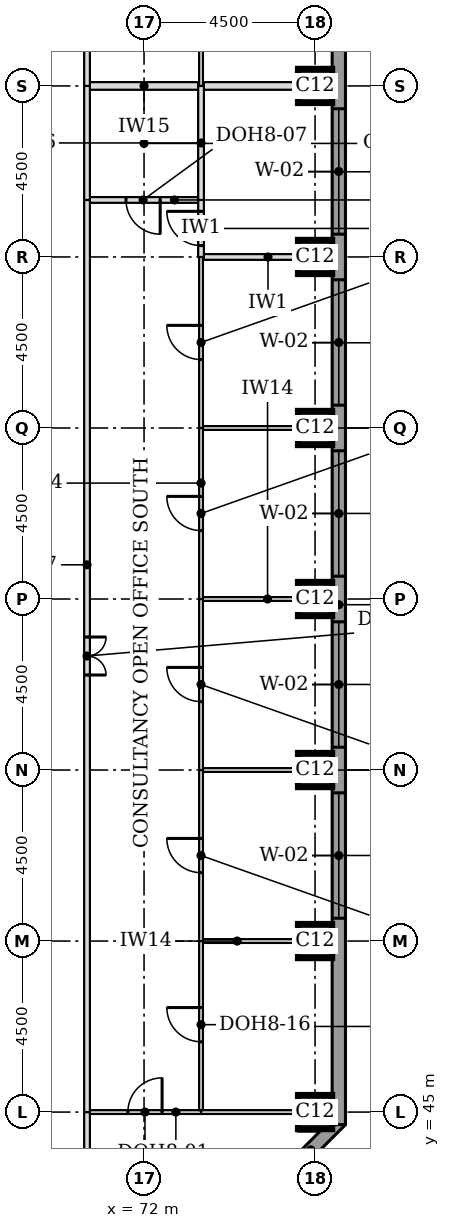
"""IFC4 building model, lengths in metres.
Left out: names, types, materials, properties, quantities, classifications, styles, units other than length and angle.
Written with IfcOpenShell. Run it as: python <this file> out.ifc"""

import sys

from ifc_helpers import new_model, si_unit, direction, frame, frame_2d, origin, origin_2d, place, context, subcontext, project, spatial, rectangle, extrude, element, fill, save


model = new_model("IFC4")
c1 = context("Model", 3, precision=1e-05, world=origin(), true_north=direction((0.0, 1.0)))
c2 = subcontext(c1, "Body", "Model", "MODEL_VIEW")
j1 = project(units=[si_unit("LENGTHUNIT", "METRE"), si_unit("PLANEANGLEUNIT", "RADIAN")], contexts=[c1])
p1 = place(None, origin())
s1 = spatial("IfcSite", under=j1, at=p1, CompositionType="ELEMENT")
p2 = place(p1, origin())
s2 = spatial("IfcBuilding", under=s1, at=p2, CompositionType="ELEMENT")
p3 = place(p2, frame((0.0, 0.0, 203.2)))
s3 = spatial("IfcBuildingStorey", under=s2, at=p3, CompositionType="ELEMENT", Elevation=203.2)
for number, where, z_axis, x_axis in (
    (1, (76.5, 45.0, 0.0), (0.0, 0.0, 1.0), (1.0, 0.0, 0.0)),
    (2, (76.5, 49.5, 0.0), (0.0, 0.0, 1.0), (1.0, 0.0, 0.0)),
    (3, (76.5, 54.0, 0.0), (0.0, 0.0, 1.0), (1.0, 0.0, 0.0)),
    (4, (76.5, 58.5, 0.0), (0.0, 0.0, 1.0), (1.0, 0.0, 0.0)),
    (5, (76.5, 63.0, 0.0), (0.0, 0.0, 1.0), (1.0, 0.0, 0.0)),
    (6, (76.5, 67.5, 0.0), (0.0, 0.0, 1.0), (1.0, 0.0, 0.0)),
    (7, (76.5, 72.0, 0.0), (0.0, 0.0, 1.0), (1.0, 0.0, 0.0)),
):
    element("IfcColumn", number, at=place(p3, frame(where, z_axis=z_axis, x_axis=x_axis)), inside=s3, PredefinedType="COLUMN", context=c2, shape_type="SweptSolid", body=[
        extrude(rectangle(XDim=0.9, YDim=0.9, at=origin_2d()), origin(), (0.0, 0.0, 1.0), 3.7),
    ])
p4 = place(p3, frame((72.208, 39.824, 0.0), z_axis=(0.0, 0.0, 1.0), x_axis=(0.707106781187, 0.707106781187, 0.0)))
e8 = element("IfcWall", 8, at=p4, inside=s3, PredefinedType="STANDARD", context=c2, shape_type="SweptSolid", body=[
    extrude(rectangle(XDim=7.027, YDim=0.35, at=frame_2d((3.513, 0.0))), origin(), (0.0, 0.0, 1.0), 3.525),
])
p5 = place(p4, frame((1.863, 0.0, 0.9)))
e9 = element("IfcOpeningElement", 9, at=p5, cuts=e8, PredefinedType="OPENING", context=c2, shape_type="SweptSolid", body=[
    extrude(rectangle(XDim=3.3, YDim=1.9, at=frame_2d((1.65, 0.95))), frame((0.0, 0.185, 0.0), z_axis=(0.0, -1.0, 0.0), x_axis=(1.0, 0.0, 0.0)), (0.0, 0.0, 1.0), 0.37),
])
p6 = place(p3, frame((77.125, 44.669, 0.0), z_axis=(0.0, 0.0, 1.0), x_axis=(0.0, 1.0, 0.0)))
e10 = element("IfcWall", 10, at=p6, inside=s3, PredefinedType="STANDARD", context=c2, shape_type="SweptSolid", body=[
    extrude(rectangle(XDim=32.163, YDim=0.35, at=frame_2d((16.081, 0.0))), origin(), (0.0, 0.0, 1.0), 3.525),
])
p7 = place(p6, frame((5.431, 0.0, 0.9)))
e11 = element("IfcOpeningElement", 11, at=p7, cuts=e10, PredefinedType="OPENING", context=c2, shape_type="SweptSolid", body=[
    extrude(rectangle(XDim=3.3, YDim=1.9, at=frame_2d((1.65, 0.95))), frame((0.0, 0.185, 0.0), z_axis=(0.0, -1.0, 0.0), x_axis=(1.0, 0.0, 0.0)), (0.0, 0.0, 1.0), 0.37),
])
p8 = place(p6, frame((9.931, 0.0, 0.9)))
e12 = element("IfcOpeningElement", 12, at=p8, cuts=e10, PredefinedType="OPENING", context=c2, shape_type="SweptSolid", body=[
    extrude(rectangle(XDim=3.3, YDim=1.9, at=frame_2d((1.65, 0.95))), frame((0.0, 0.185, 0.0), z_axis=(0.0, -1.0, 0.0), x_axis=(1.0, 0.0, 0.0)), (0.0, 0.0, 1.0), 0.37),
])
p9 = place(p6, frame((14.431, 0.0, 0.9)))
e13 = element("IfcOpeningElement", 13, at=p9, cuts=e10, PredefinedType="OPENING", context=c2, shape_type="SweptSolid", body=[
    extrude(rectangle(XDim=3.3, YDim=1.9, at=frame_2d((1.65, 0.95))), frame((0.0, 0.185, 0.0), z_axis=(0.0, -1.0, 0.0), x_axis=(1.0, 0.0, 0.0)), (0.0, 0.0, 1.0), 0.37),
])
p10 = place(p6, frame((18.931, 0.0, 0.9)))
e14 = element("IfcOpeningElement", 14, at=p10, cuts=e10, PredefinedType="OPENING", context=c2, shape_type="SweptSolid", body=[
    extrude(rectangle(XDim=3.3, YDim=1.9, at=frame_2d((1.65, 0.95))), frame((0.0, 0.185, 0.0), z_axis=(0.0, -1.0, 0.0), x_axis=(1.0, 0.0, 0.0)), (0.0, 0.0, 1.0), 0.37),
])
p11 = place(p6, frame((23.431, 0.0, 0.9)))
e15 = element("IfcOpeningElement", 15, at=p11, cuts=e10, PredefinedType="OPENING", context=c2, shape_type="SweptSolid", body=[
    extrude(rectangle(XDim=3.3, YDim=1.9, at=frame_2d((1.65, 0.95))), frame((0.0, 0.185, 0.0), z_axis=(0.0, -1.0, 0.0), x_axis=(1.0, 0.0, 0.0)), (0.0, 0.0, 1.0), 0.37),
])
p12 = place(p3, frame((70.575, 45.0, 0.0), z_axis=(0.0, 0.0, 1.0), x_axis=(1.0, 0.0, 0.0)))
e16 = element("IfcWall", 16, at=p12, inside=s3, PredefinedType="PARTITIONING", context=c2, shape_type="SweptSolid", body=[
    extrude(rectangle(XDim=2.925, YDim=0.1, at=frame_2d((1.462, 0.0))), origin(), (0.0, 0.0, 1.0), 2.948),
])
p13 = place(p12, frame((1.0, 0.0, 0.0)))
e17 = element("IfcOpeningElement", 17, at=p13, cuts=e16, PredefinedType="OPENING", context=c2, shape_type="SweptSolid", body=[
    extrude(rectangle(XDim=0.9, YDim=2.1, at=frame_2d((0.45, 1.05))), frame((0.0, 0.06, 0.0), z_axis=(0.0, -1.0, 0.0), x_axis=(1.0, 0.0, 0.0)), (0.0, 0.0, 1.0), 0.12),
])
p14 = place(p3, frame((73.5, 45.0, 0.0), z_axis=(0.0, 0.0, 1.0), x_axis=(1.0, 0.0, 0.0)))
e18 = element("IfcWall", 18, at=p14, inside=s3, PredefinedType="PARTITIONING", context=c2, shape_type="SweptSolid", body=[
    extrude(rectangle(XDim=2.55, YDim=0.1, at=frame_2d((1.275, 0.0))), origin(), (0.0, 0.0, 1.0), 2.948),
])
for number, where, z_axis, x_axis in (
    (19, (73.55, 49.5, 0.0), (0.0, 0.0, 1.0), (1.0, 0.0, 0.0)),
    (20, (73.55, 54.0, 0.0), (0.0, 0.0, 1.0), (1.0, 0.0, 0.0)),
    (21, (73.55, 58.5, 0.0), (0.0, 0.0, 1.0), (1.0, 0.0, 0.0)),
    (22, (73.55, 63.0, 0.0), (0.0, 0.0, 1.0), (1.0, 0.0, 0.0)),
):
    element("IfcWall", number, at=place(p3, frame(where, z_axis=z_axis, x_axis=x_axis)), inside=s3, PredefinedType="PARTITIONING", context=c2, shape_type="SweptSolid", body=[
        extrude(rectangle(XDim=3.4, YDim=0.1, at=frame_2d((1.7, 0.0))), origin(), (0.0, 0.0, 1.0), 3.55),
    ])
p15 = place(p3, frame((73.575, 67.5, 0.0), z_axis=(0.0, 0.0, 1.0), x_axis=(1.0, 0.0, 0.0)))
e23 = element("IfcWall", 23, at=p15, inside=s3, PredefinedType="PARTITIONING", context=c2, shape_type="SweptSolid", body=[
    extrude(rectangle(XDim=3.375, YDim=0.15, at=frame_2d((1.688, 0.0))), origin(), (0.0, 0.0, 1.0), 3.55),
])
p16 = place(p3, frame((70.575, 69.0, 0.0), z_axis=(0.0, 0.0, 1.0), x_axis=(1.0, 0.0, 0.0)))
e24 = element("IfcWall", 24, at=p16, inside=s3, PredefinedType="PARTITIONING", context=c2, shape_type="SweptSolid", body=[
    extrude(rectangle(XDim=2.85, YDim=0.15, at=frame_2d((1.425, 0.0))), origin(), (0.0, 0.0, 1.0), 3.55),
])
p17 = place(p16, frame((0.95, 0.0, 0.0)))
e25 = element("IfcOpeningElement", 25, at=p17, cuts=e24, PredefinedType="OPENING", context=c2, shape_type="SweptSolid", body=[
    extrude(rectangle(XDim=0.9, YDim=2.1, at=frame_2d((0.45, 1.05))), frame((0.0, 0.085, 0.0), z_axis=(0.0, -1.0, 0.0), x_axis=(1.0, 0.0, 0.0)), (0.0, 0.0, 1.0), 0.17),
])
p18 = place(p3, frame((70.575, 72.0, 0.0), z_axis=(0.0, 0.0, 1.0), x_axis=(1.0, 0.0, 0.0)))
e26 = element("IfcWall", 26, at=p18, inside=s3, PredefinedType="PARTITIONING", context=c2, shape_type="SweptSolid", body=[
    extrude(rectangle(XDim=2.85, YDim=0.2, at=frame_2d((1.425, 0.0))), origin(), (0.0, 0.0, 1.0), 3.55),
])
p19 = place(p3, frame((73.575, 72.0, 0.0), z_axis=(0.0, 0.0, 1.0), x_axis=(1.0, 0.0, 0.0)))
e27 = element("IfcWall", 27, at=p19, inside=s3, PredefinedType="PARTITIONING", context=c2, shape_type="SweptSolid", body=[
    extrude(rectangle(XDim=3.375, YDim=0.2, at=frame_2d((1.688, 0.0))), origin(), (0.0, 0.0, 1.0), 3.55),
])
p20 = place(p3, frame((70.5, 40.05, 0.0), z_axis=(0.0, 0.0, 1.0), x_axis=(0.0, 1.0, 0.0)))
e28 = element("IfcWall", 28, at=p20, inside=s3, PredefinedType="PARTITIONING", context=c2, shape_type="SweptSolid", body=[
    extrude(rectangle(XDim=4.95, YDim=0.15, at=frame_2d((2.475, 0.0))), origin(), (0.0, 0.0, 1.0), 3.55),
])
p21 = place(p3, frame((70.5, 45.0, 0.0), z_axis=(0.0, 0.0, 1.0), x_axis=(0.0, 1.0, 0.0)))
e29 = element("IfcWall", 29, at=p21, inside=s3, PredefinedType="PARTITIONING", context=c2, shape_type="SweptSolid", body=[
    extrude(rectangle(XDim=24.0, YDim=0.15, at=frame_2d((12.0, 0.0))), origin(), (0.0, 0.0, 1.0), 3.55),
])
p22 = place(p21, frame((11.5, 0.0, 0.0)))
e30 = element("IfcOpeningElement", 30, at=p22, cuts=e29, PredefinedType="OPENING", context=c2, shape_type="SweptSolid", body=[
    extrude(rectangle(XDim=1.0, YDim=2.1, at=frame_2d((0.5, 1.05))), frame((0.0, 0.085, 0.0), z_axis=(0.0, -1.0, 0.0), x_axis=(1.0, 0.0, 0.0)), (0.0, 0.0, 1.0), 0.17),
])
p23 = place(p3, frame((73.5, 45.05, 0.0), z_axis=(0.0, 0.0, 1.0), x_axis=(0.0, 1.0, 0.0)))
e31 = element("IfcWall", 31, at=p23, inside=s3, PredefinedType="PARTITIONING", context=c2, shape_type="SweptSolid", body=[
    extrude(rectangle(XDim=4.45, YDim=0.1, at=frame_2d((2.225, 0.0))), origin(), (0.0, 0.0, 1.0), 3.55),
])
p24 = place(p23, frame((1.8, 0.0, 0.0)))
e32 = element("IfcOpeningElement", 32, at=p24, cuts=e31, PredefinedType="OPENING", context=c2, shape_type="SweptSolid", body=[
    extrude(rectangle(XDim=0.9, YDim=2.1, at=frame_2d((0.45, 1.05))), frame((0.0, 0.06, 0.0), z_axis=(0.0, -1.0, 0.0), x_axis=(1.0, 0.0, 0.0)), (0.0, 0.0, 1.0), 0.12),
])
p25 = place(p3, frame((73.5, 49.5, 0.0), z_axis=(0.0, 0.0, 1.0), x_axis=(0.0, 1.0, 0.0)))
e33 = element("IfcWall", 33, at=p25, inside=s3, PredefinedType="PARTITIONING", context=c2, shape_type="SweptSolid", body=[
    extrude(rectangle(XDim=4.5, YDim=0.1, at=frame_2d((2.25, 0.0))), origin(), (0.0, 0.0, 1.0), 3.55),
])
p26 = place(p25, frame((1.8, 0.0, 0.0)))
e34 = element("IfcOpeningElement", 34, at=p26, cuts=e33, PredefinedType="OPENING", context=c2, shape_type="SweptSolid", body=[
    extrude(rectangle(XDim=0.9, YDim=2.1, at=frame_2d((0.45, 1.05))), frame((0.0, 0.06, 0.0), z_axis=(0.0, -1.0, 0.0), x_axis=(1.0, 0.0, 0.0)), (0.0, 0.0, 1.0), 0.12),
])
p27 = place(p3, frame((73.5, 54.0, 0.0), z_axis=(0.0, 0.0, 1.0), x_axis=(0.0, 1.0, 0.0)))
e35 = element("IfcWall", 35, at=p27, inside=s3, PredefinedType="PARTITIONING", context=c2, shape_type="SweptSolid", body=[
    extrude(rectangle(XDim=4.5, YDim=0.1, at=frame_2d((2.25, 0.0))), origin(), (0.0, 0.0, 1.0), 3.55),
])
p28 = place(p27, frame((1.8, 0.0, 0.0)))
e36 = element("IfcOpeningElement", 36, at=p28, cuts=e35, PredefinedType="OPENING", context=c2, shape_type="SweptSolid", body=[
    extrude(rectangle(XDim=0.9, YDim=2.1, at=frame_2d((0.45, 1.05))), frame((0.0, 0.06, 0.0), z_axis=(0.0, -1.0, 0.0), x_axis=(1.0, 0.0, 0.0)), (0.0, 0.0, 1.0), 0.12),
])
p29 = place(p3, frame((73.5, 58.5, 0.0), z_axis=(0.0, 0.0, 1.0), x_axis=(0.0, 1.0, 0.0)))
e37 = element("IfcWall", 37, at=p29, inside=s3, PredefinedType="PARTITIONING", context=c2, shape_type="SweptSolid", body=[
    extrude(rectangle(XDim=4.5, YDim=0.1, at=frame_2d((2.25, 0.0))), origin(), (0.0, 0.0, 1.0), 3.55),
])
p30 = place(p29, frame((1.8, 0.0, 0.0)))
e38 = element("IfcOpeningElement", 38, at=p30, cuts=e37, PredefinedType="OPENING", context=c2, shape_type="SweptSolid", body=[
    extrude(rectangle(XDim=0.9, YDim=2.1, at=frame_2d((0.45, 1.05))), frame((0.0, 0.06, 0.0), z_axis=(0.0, -1.0, 0.0), x_axis=(1.0, 0.0, 0.0)), (0.0, 0.0, 1.0), 0.12),
])
p31 = place(p3, frame((73.5, 63.0, 0.0), z_axis=(0.0, 0.0, 1.0), x_axis=(0.0, 1.0, 0.0)))
e39 = element("IfcWall", 39, at=p31, inside=s3, PredefinedType="PARTITIONING", context=c2, shape_type="SweptSolid", body=[
    extrude(rectangle(XDim=4.5, YDim=0.1, at=frame_2d((2.25, 0.0))), origin(), (0.0, 0.0, 1.0), 3.55),
])
p32 = place(p31, frame((1.8, 0.0, 0.0)))
e40 = element("IfcOpeningElement", 40, at=p32, cuts=e39, PredefinedType="OPENING", context=c2, shape_type="SweptSolid", body=[
    extrude(rectangle(XDim=0.9, YDim=2.1, at=frame_2d((0.45, 1.05))), frame((0.0, 0.06, 0.0), z_axis=(0.0, -1.0, 0.0), x_axis=(1.0, 0.0, 0.0)), (0.0, 0.0, 1.0), 0.12),
])
p33 = place(p3, frame((73.5, 67.5, 0.0), z_axis=(0.0, 0.0, 1.0), x_axis=(0.0, 1.0, 0.0)))
e41 = element("IfcWall", 41, at=p33, inside=s3, PredefinedType="PARTITIONING", context=c2, shape_type="SweptSolid", body=[
    extrude(rectangle(XDim=1.5, YDim=0.15, at=frame_2d((0.75, 0.0))), origin(), (0.0, 0.0, 1.0), 3.55),
])
p34 = place(p33, frame((0.3, 0.0, 0.0)))
e42 = element("IfcOpeningElement", 42, at=p34, cuts=e41, PredefinedType="OPENING", context=c2, shape_type="SweptSolid", body=[
    extrude(rectangle(XDim=0.9, YDim=2.1, at=frame_2d((0.45, 1.05))), frame((0.0, 0.085, 0.0), z_axis=(0.0, -1.0, 0.0), x_axis=(1.0, 0.0, 0.0)), (0.0, 0.0, 1.0), 0.17),
])
for number, where, z_axis, x_axis in (
    (43, (70.5, 69.0, 0.0), (0.0, 0.0, 1.0), (0.0, 1.0, 0.0)),
    (44, (73.5, 69.0, 0.0), (0.0, 0.0, 1.0), (0.0, 1.0, 0.0)),
):
    element("IfcWall", number, at=place(p3, frame(where, z_axis=z_axis, x_axis=x_axis)), inside=s3, PredefinedType="PARTITIONING", context=c2, shape_type="SweptSolid", body=[
        extrude(rectangle(XDim=3.0, YDim=0.15, at=frame_2d((1.5, 0.0))), origin(), (0.0, 0.0, 1.0), 3.55),
    ])
p35 = place(p3, frame((70.5, 72.0, 0.0), z_axis=(0.0, 0.0, 1.0), x_axis=(0.0, 1.0, 0.0)))
e45 = element("IfcWall", 45, at=p35, inside=s3, PredefinedType="PARTITIONING", context=c2, shape_type="SweptSolid", body=[
    extrude(rectangle(XDim=4.5, YDim=0.15, at=frame_2d((2.25, 0.0))), origin(), (0.0, 0.0, 1.0), 3.55),
])
p36 = place(p35, frame((1.75, 0.0, 0.0)))
e46 = element("IfcOpeningElement", 46, at=p36, cuts=e45, PredefinedType="OPENING", context=c2, shape_type="SweptSolid", body=[
    extrude(rectangle(XDim=1.0, YDim=2.1, at=frame_2d((0.5, 1.05))), frame((0.0, 0.085, 0.0), z_axis=(0.0, -1.0, 0.0), x_axis=(1.0, 0.0, 0.0)), (0.0, 0.0, 1.0), 0.17),
])
p37 = place(p3, frame((73.5, 72.0, 0.0), z_axis=(0.0, 0.0, 1.0), x_axis=(0.0, 1.0, 0.0)))
e47 = element("IfcWall", 47, at=p37, inside=s3, PredefinedType="PARTITIONING", context=c2, shape_type="SweptSolid", body=[
    extrude(rectangle(XDim=4.425, YDim=0.1, at=frame_2d((2.212, 0.0))), origin(), (0.0, 0.0, 1.0), 3.55),
])
p38 = place(p37, frame((1.75, 0.0, 0.0)))
e48 = element("IfcOpeningElement", 48, at=p38, cuts=e47, PredefinedType="OPENING", context=c2, shape_type="SweptSolid", body=[
    extrude(rectangle(XDim=0.9, YDim=2.1, at=frame_2d((0.45, 1.05))), frame((0.0, 0.06, 0.0), z_axis=(0.0, -1.0, 0.0), x_axis=(1.0, 0.0, 0.0)), (0.0, 0.0, 1.0), 0.12),
])
p39 = place(p7, origin())
e49 = element("IfcWindow", 49, at=p39, inside=s3, PartitioningType="SINGLE_PANEL", PredefinedType="WINDOW", context=c2, shape_type="SweptSolid", body=[
    extrude(rectangle(XDim=3.3, YDim=1.9, at=frame_2d((1.65, 0.95))), frame((0.0, 0.085, 0.0), z_axis=(0.0, -1.0, 0.0), x_axis=(1.0, 0.0, 0.0)), (0.0, 0.0, 1.0), 0.06),
])
fill(e11, e49)
p40 = place(p8, origin())
e50 = element("IfcWindow", 50, at=p40, inside=s3, PartitioningType="SINGLE_PANEL", PredefinedType="WINDOW", context=c2, shape_type="SweptSolid", body=[
    extrude(rectangle(XDim=3.3, YDim=1.9, at=frame_2d((1.65, 0.95))), frame((0.0, 0.085, 0.0), z_axis=(0.0, -1.0, 0.0), x_axis=(1.0, 0.0, 0.0)), (0.0, 0.0, 1.0), 0.06),
])
fill(e12, e50)
p41 = place(p9, origin())
e51 = element("IfcWindow", 51, at=p41, inside=s3, PartitioningType="SINGLE_PANEL", PredefinedType="WINDOW", context=c2, shape_type="SweptSolid", body=[
    extrude(rectangle(XDim=3.3, YDim=1.9, at=frame_2d((1.65, 0.95))), frame((0.0, 0.085, 0.0), z_axis=(0.0, -1.0, 0.0), x_axis=(1.0, 0.0, 0.0)), (0.0, 0.0, 1.0), 0.06),
])
fill(e13, e51)
p42 = place(p10, origin())
e52 = element("IfcWindow", 52, at=p42, inside=s3, PartitioningType="SINGLE_PANEL", PredefinedType="WINDOW", context=c2, shape_type="SweptSolid", body=[
    extrude(rectangle(XDim=3.3, YDim=1.9, at=frame_2d((1.65, 0.95))), frame((0.0, 0.085, 0.0), z_axis=(0.0, -1.0, 0.0), x_axis=(1.0, 0.0, 0.0)), (0.0, 0.0, 1.0), 0.06),
])
fill(e14, e52)
p43 = place(p11, origin())
e53 = element("IfcWindow", 53, at=p43, inside=s3, PartitioningType="SINGLE_PANEL", PredefinedType="WINDOW", context=c2, shape_type="SweptSolid", body=[
    extrude(rectangle(XDim=3.3, YDim=1.9, at=frame_2d((1.65, 0.95))), frame((0.0, 0.085, 0.0), z_axis=(0.0, -1.0, 0.0), x_axis=(1.0, 0.0, 0.0)), (0.0, 0.0, 1.0), 0.06),
])
fill(e15, e53)
p44 = place(p22, frame((1.0, 0.0, 0.0), z_axis=(0.0, 0.0, 1.0), x_axis=(-1.0, 0.0, 0.0)))
e54 = element("IfcDoor", 54, at=p44, inside=s3, OperationType="DOUBLE_DOOR_SINGLE_SWING", PredefinedType="DOOR", context=c2, shape_type="SweptSolid", body=[
    extrude(rectangle(XDim=1.0, YDim=2.1, at=frame_2d((0.5, 1.05))), frame((0.0, 0.025, 0.0), z_axis=(0.0, -1.0, 0.0), x_axis=(1.0, 0.0, 0.0)), (0.0, 0.0, 1.0), 0.05),
])
fill(e30, e54)
p45 = place(p13, origin())
e55 = element("IfcDoor", 55, at=p45, inside=s3, OperationType="SINGLE_SWING_RIGHT", PredefinedType="DOOR", context=c2, shape_type="SweptSolid", body=[
    extrude(rectangle(XDim=0.9, YDim=2.1, at=frame_2d((0.45, 1.05))), frame((0.0, 0.025, 0.0), z_axis=(0.0, -1.0, 0.0), x_axis=(1.0, 0.0, 0.0)), (0.0, 0.0, 1.0), 0.05),
])
fill(e17, e55)
p46 = place(p24, origin())
e56 = element("IfcDoor", 56, at=p46, inside=s3, OperationType="SINGLE_SWING_RIGHT", PredefinedType="DOOR", context=c2, shape_type="SweptSolid", body=[
    extrude(rectangle(XDim=0.9, YDim=2.1, at=frame_2d((0.45, 1.05))), frame((0.0, 0.025, 0.0), z_axis=(0.0, -1.0, 0.0), x_axis=(1.0, 0.0, 0.0)), (0.0, 0.0, 1.0), 0.05),
])
fill(e32, e56)
p47 = place(p26, origin())
e57 = element("IfcDoor", 57, at=p47, inside=s3, OperationType="SINGLE_SWING_RIGHT", PredefinedType="DOOR", context=c2, shape_type="SweptSolid", body=[
    extrude(rectangle(XDim=0.9, YDim=2.1, at=frame_2d((0.45, 1.05))), frame((0.0, 0.025, 0.0), z_axis=(0.0, -1.0, 0.0), x_axis=(1.0, 0.0, 0.0)), (0.0, 0.0, 1.0), 0.05),
])
fill(e34, e57)
p48 = place(p28, origin())
e58 = element("IfcDoor", 58, at=p48, inside=s3, OperationType="SINGLE_SWING_RIGHT", PredefinedType="DOOR", context=c2, shape_type="SweptSolid", body=[
    extrude(rectangle(XDim=0.9, YDim=2.1, at=frame_2d((0.45, 1.05))), frame((0.0, 0.025, 0.0), z_axis=(0.0, -1.0, 0.0), x_axis=(1.0, 0.0, 0.0)), (0.0, 0.0, 1.0), 0.05),
])
fill(e36, e58)
p49 = place(p30, origin())
e59 = element("IfcDoor", 59, at=p49, inside=s3, OperationType="SINGLE_SWING_RIGHT", PredefinedType="DOOR", context=c2, shape_type="SweptSolid", body=[
    extrude(rectangle(XDim=0.9, YDim=2.1, at=frame_2d((0.45, 1.05))), frame((0.0, 0.025, 0.0), z_axis=(0.0, -1.0, 0.0), x_axis=(1.0, 0.0, 0.0)), (0.0, 0.0, 1.0), 0.05),
])
fill(e38, e59)
p50 = place(p32, origin())
e60 = element("IfcDoor", 60, at=p50, inside=s3, OperationType="SINGLE_SWING_RIGHT", PredefinedType="DOOR", context=c2, shape_type="SweptSolid", body=[
    extrude(rectangle(XDim=0.9, YDim=2.1, at=frame_2d((0.45, 1.05))), frame((0.0, 0.025, 0.0), z_axis=(0.0, -1.0, 0.0), x_axis=(1.0, 0.0, 0.0)), (0.0, 0.0, 1.0), 0.05),
])
fill(e40, e60)
p51 = place(p17, frame((0.9, 0.0, 0.0), z_axis=(0.0, 0.0, 1.0), x_axis=(-1.0, 0.0, 0.0)))
e61 = element("IfcDoor", 61, at=p51, inside=s3, OperationType="SINGLE_SWING_LEFT", PredefinedType="DOOR", context=c2, shape_type="SweptSolid", body=[
    extrude(rectangle(XDim=0.9, YDim=2.1, at=frame_2d((0.45, 1.05))), frame((0.0, 0.025, 0.0), z_axis=(0.0, -1.0, 0.0), x_axis=(1.0, 0.0, 0.0)), (0.0, 0.0, 1.0), 0.05),
])
fill(e25, e61)
p52 = place(p34, origin())
e62 = element("IfcDoor", 62, at=p52, inside=s3, OperationType="SINGLE_SWING_RIGHT", PredefinedType="DOOR", context=c2, shape_type="SweptSolid", body=[
    extrude(rectangle(XDim=0.9, YDim=2.1, at=frame_2d((0.45, 1.05))), frame((0.0, 0.025, 0.0), z_axis=(0.0, -1.0, 0.0), x_axis=(1.0, 0.0, 0.0)), (0.0, 0.0, 1.0), 0.05),
])
fill(e42, e62)
save(model, sys.argv[1])
